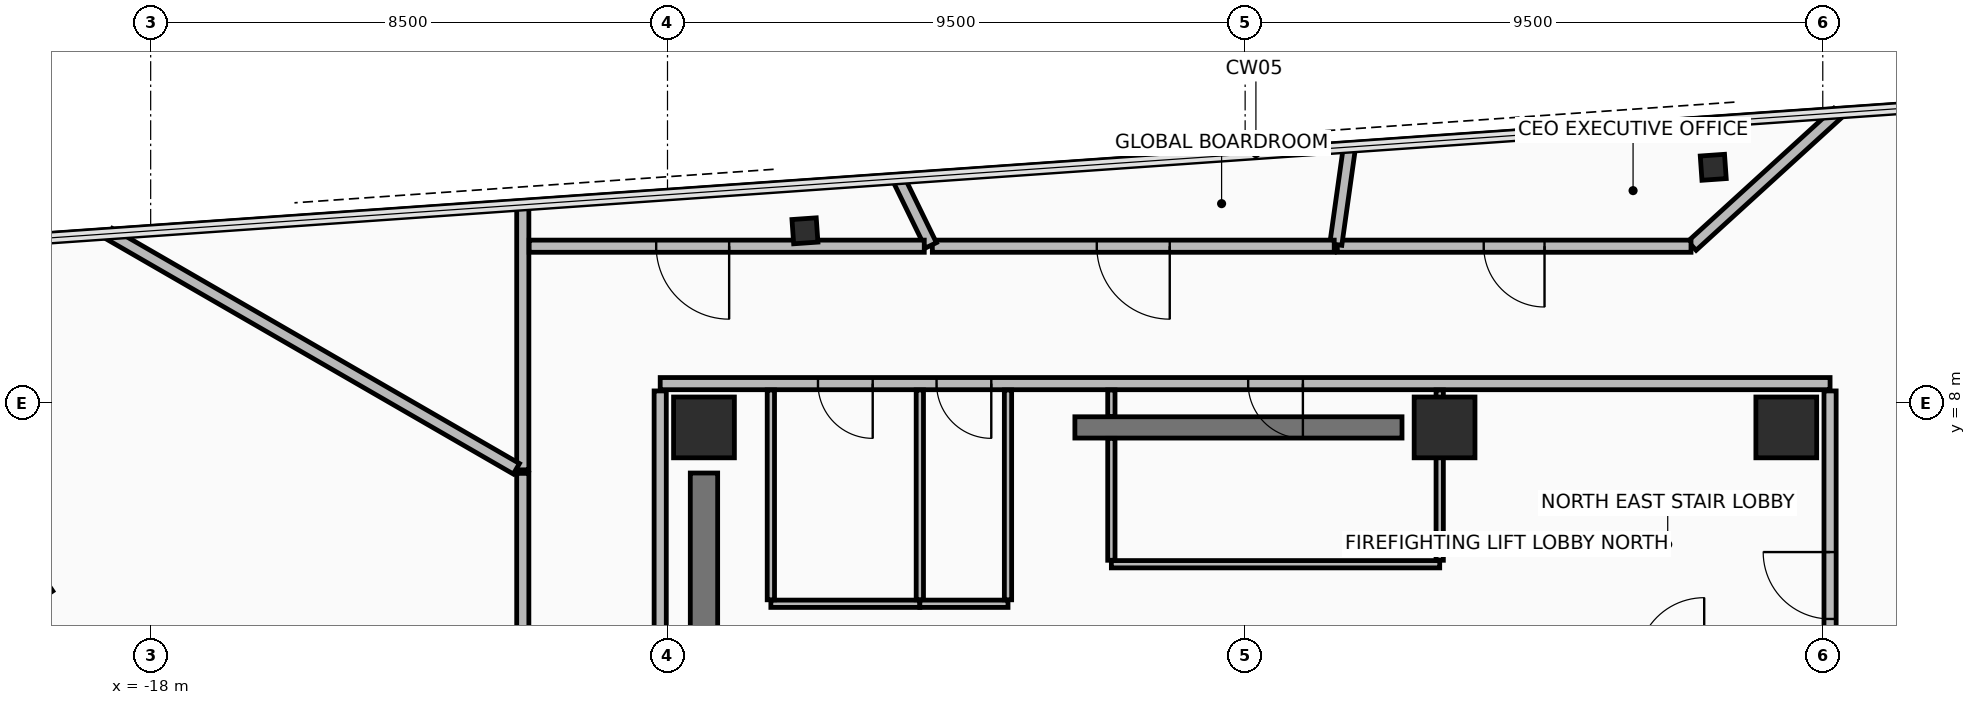
"""IFC4 building model, lengths in metres.
Left out: names, types, materials, properties, quantities, classifications, styles, units other than length and angle.
Written with IfcOpenShell. Run it as: python <this file> out.ifc"""

import sys

from ifc_helpers import new_model, si_unit, direction, frame, frame_2d, origin, origin_2d, place, context, subcontext, project, spatial, rectangle, hollow_rectangle, extrude, element, fill, save


model = new_model("IFC4")
c1 = context("Model", 3, precision=1e-05, world=origin(), true_north=direction((0.0, 1.0)))
c2 = subcontext(c1, "Body", "Model", "MODEL_VIEW")
j1 = project(units=[si_unit("LENGTHUNIT", "METRE"), si_unit("PLANEANGLEUNIT", "RADIAN")], contexts=[c1])
p1 = place(None, origin())
s1 = spatial("IfcSite", under=j1, at=p1, CompositionType="ELEMENT")
p2 = place(p1, origin())
s2 = spatial("IfcBuilding", under=s1, at=p2, CompositionType="ELEMENT")
p3 = place(p2, frame((0.0, 0.0, 253.4)))
s3 = spatial("IfcBuildingStorey", under=s2, at=p3, CompositionType="ELEMENT", Elevation=253.4)
for number, where, z_axis, x_axis in (
    (1, (8.9, 7.6, 0.0), (0.0, 0.0, 1.0), (1.0, 0.0, 0.0)),
    (2, (3.28, 7.6, 0.0), (0.0, 0.0, 1.0), (1.0, 0.0, 0.0)),
    (3, (-8.9, 7.6, 0.0), (0.0, 0.0, 1.0), (1.0, 0.0, 0.0)),
):
    element("IfcColumn", number, at=place(p3, frame(where, z_axis=z_axis, x_axis=x_axis)), inside=s3, PredefinedType="COLUMN", context=c2, shape_type="SweptSolid", body=[
        extrude(rectangle(XDim=1.0, YDim=1.0, at=origin_2d()), origin(), (0.0, 0.0, 1.0), 3.6),
    ])
p4 = place(p3, frame((7.699, 11.878, -0.19), z_axis=(0.0, 0.0, 1.0), x_axis=(0.99756392851, 0.069758214822, 0.0)))
e4 = element("IfcColumn", 4, at=p4, inside=s3, PredefinedType="COLUMN", context=c2, shape_type="SweptSolid", body=[
    extrude(hollow_rectangle(XDim=0.4, YDim=0.4, WallThickness=0.025, at=origin_2d()), origin(), (0.0, 0.0, 1.0), 3.79),
])
p5 = place(p3, frame((-7.24, 10.833, 0.0), z_axis=(0.0, 0.0, 1.0), x_axis=(0.99756392851, 0.069758214822, 0.0)))
e5 = element("IfcColumn", 5, at=p5, inside=s3, PredefinedType="COLUMN", context=c2, shape_type="SweptSolid", body=[
    extrude(hollow_rectangle(XDim=0.4, YDim=0.4, WallThickness=0.025, at=origin_2d()), origin(), (0.0, 0.0, 1.0), 3.6),
])
p6 = place(p3, frame((-23.526, 10.446, 0.0), z_axis=(0.0, 0.0, 1.0), x_axis=(0.559187716425, -0.829041071238, 0.0)))
e6 = element("IfcWall", 6, at=p6, inside=s3, PredefinedType="STANDARD", context=c2, shape_type="SweptSolid", body=[
    extrude(rectangle(XDim=6.78, YDim=0.3, at=frame_2d((3.39, 0.0))), origin(), (0.0, 0.0, 1.0), 2.765),
])
p7 = place(p6, frame((3.186, 0.0, 0.0)))
e7 = element("IfcOpeningElement", 7, at=p7, cuts=e6, PredefinedType="OPENING", context=c2, shape_type="SweptSolid", body=[
    extrude(rectangle(XDim=1.1, YDim=2.2, at=frame_2d((0.55, 1.1))), frame((0.0, 0.16, 0.0), z_axis=(0.0, -1.0, 0.0), x_axis=(1.0, 0.0, 0.0)), (0.0, 0.0, 1.0), 0.32),
])
p8 = place(p3, frame((-2.8, 7.6, 0.0), z_axis=(0.0, 0.0, 1.0), x_axis=(1.0, 0.0, 0.0)))
e8 = element("IfcWall", 8, at=p8, inside=s3, PredefinedType="SHEAR", context=c2, shape_type="SweptSolid", body=[
    extrude(rectangle(XDim=5.38, YDim=0.35, at=frame_2d((2.69, 0.0))), origin(), (0.0, 0.0, 1.0), 3.42),
])
p9 = place(p3, frame((-8.9, -3.85, 0.0), z_axis=(0.0, 0.0, 1.0), x_axis=(0.0, 1.0, 0.0)))
e9 = element("IfcWall", 9, at=p9, inside=s3, PredefinedType="SHEAR", context=c2, shape_type="SweptSolid", body=[
    extrude(rectangle(XDim=10.7, YDim=0.45, at=frame_2d((5.35, 0.0))), origin(), (0.0, 0.0, 1.0), 3.42),
])
p10 = place(p3, frame((9.62, 8.32, 0.0), z_axis=(0.0, 0.0, 1.0), x_axis=(-1.0, 0.0, 0.0)))
e10 = element("IfcWall", 10, at=p10, inside=s3, PredefinedType="PARTITIONING", context=c2, shape_type="SweptSolid", body=[
    extrude(rectangle(XDim=19.24, YDim=0.2, at=frame_2d((9.62, 0.0))), origin(), (0.0, 0.0, 1.0), 2.915),
])
p11 = place(p10, frame((8.67, 0.0, 0.0)))
e11 = element("IfcOpeningElement", 11, at=p11, cuts=e10, PredefinedType="OPENING", context=c2, shape_type="SweptSolid", body=[
    extrude(rectangle(XDim=0.9, YDim=2.1, at=frame_2d((0.45, 1.05))), frame((0.0, 0.11, 0.0), z_axis=(0.0, -1.0, 0.0), x_axis=(1.0, 0.0, 0.0)), (0.0, 0.0, 1.0), 0.22),
])
p12 = place(p10, frame((15.745, 0.0, 0.0)))
e12 = element("IfcOpeningElement", 12, at=p12, cuts=e10, PredefinedType="OPENING", context=c2, shape_type="SweptSolid", body=[
    extrude(rectangle(XDim=0.9, YDim=2.1, at=frame_2d((0.45, 1.05))), frame((0.0, 0.11, 0.0), z_axis=(0.0, -1.0, 0.0), x_axis=(1.0, 0.0, 0.0)), (0.0, 0.0, 1.0), 0.22),
])
p13 = place(p10, frame((13.795, 0.0, 0.0)))
e13 = element("IfcOpeningElement", 13, at=p13, cuts=e10, PredefinedType="OPENING", context=c2, shape_type="SweptSolid", body=[
    extrude(rectangle(XDim=0.9, YDim=2.1, at=frame_2d((0.45, 1.05))), frame((0.0, 0.11, 0.0), z_axis=(0.0, -1.0, 0.0), x_axis=(1.0, 0.0, 0.0)), (0.0, 0.0, 1.0), 0.22),
])
p14 = place(p3, frame((-9.62, 8.2, 0.0), z_axis=(0.0, 0.0, 1.0), x_axis=(0.0, -1.0, 0.0)))
e14 = element("IfcWall", 14, at=p14, inside=s3, PredefinedType="PARTITIONING", context=c2, shape_type="SweptSolid", body=[
    extrude(rectangle(XDim=16.4, YDim=0.2, at=frame_2d((8.2, 0.0))), origin(), (0.0, 0.0, 1.0), 2.765),
])
p15 = place(p14, frame((12.65, 0.0, 0.0)))
e15 = element("IfcOpeningElement", 15, at=p15, cuts=e14, PredefinedType="OPENING", context=c2, shape_type="SweptSolid", body=[
    extrude(rectangle(XDim=1.1, YDim=2.15, at=frame_2d((0.55, 1.075))), frame((0.0, 0.11, 0.0), z_axis=(0.0, -1.0, 0.0), x_axis=(1.0, 0.0, 0.0)), (0.0, 0.0, 1.0), 0.22),
])
p16 = place(p3, frame((9.62, -8.2, 0.0), z_axis=(0.0, 0.0, 1.0), x_axis=(0.0, 1.0, 0.0)))
e16 = element("IfcWall", 16, at=p16, inside=s3, PredefinedType="PARTITIONING", context=c2, shape_type="SweptSolid", body=[
    extrude(rectangle(XDim=16.4, YDim=0.2, at=frame_2d((8.2, 0.0))), origin(), (0.0, 0.0, 1.0), 2.915),
])
p17 = place(p16, frame((12.65, 0.0, 0.0)))
e17 = element("IfcOpeningElement", 17, at=p17, cuts=e16, PredefinedType="OPENING", context=c2, shape_type="SweptSolid", body=[
    extrude(rectangle(XDim=1.1, YDim=2.15, at=frame_2d((0.55, 1.075))), frame((0.0, 0.11, 0.0), z_axis=(0.0, -1.0, 0.0), x_axis=(1.0, 0.0, 0.0)), (0.0, 0.0, 1.0), 0.22),
])
p18 = place(p3, frame((-2.2, 5.35, 0.0), z_axis=(0.0, 0.0, 1.0), x_axis=(1.0, 0.0, 0.0)))
e18 = element("IfcWall", 18, at=p18, inside=s3, PredefinedType="PARTITIONING", context=c2, shape_type="SweptSolid", body=[
    extrude(rectangle(XDim=5.4, YDim=0.12, at=frame_2d((2.7, 0.0))), origin(), (0.0, 0.0, 1.0), 2.715),
])
p19 = place(p3, frame((3.2, 5.415, 0.0), z_axis=(0.0, 0.0, 1.0), x_axis=(0.0, 1.0, 0.0)))
e19 = element("IfcWall", 19, at=p19, inside=s3, PredefinedType="PARTITIONING", context=c2, shape_type="SweptSolid", body=[
    extrude(rectangle(XDim=2.8, YDim=0.12, at=frame_2d((1.4, 0.0))), origin(), (0.0, 0.0, 1.0), 2.715),
])
p20 = place(p3, frame((-2.2, 8.215, 0.0), z_axis=(0.0, 0.0, 1.0), x_axis=(0.0, -1.0, 0.0)))
e20 = element("IfcWall", 20, at=p20, inside=s3, PredefinedType="PARTITIONING", context=c2, shape_type="SweptSolid", body=[
    extrude(rectangle(XDim=0.435, YDim=0.12, at=frame_2d((0.218, 0.0))), origin(), (0.0, 0.0, 1.0), 2.715),
])
p21 = place(p3, frame((-2.2, 7.42, 0.0), z_axis=(0.0, 0.0, 1.0), x_axis=(0.0, -1.0, 0.0)))
e21 = element("IfcWall", 21, at=p21, inside=s3, PredefinedType="PARTITIONING", context=c2, shape_type="SweptSolid", body=[
    extrude(rectangle(XDim=2.005, YDim=0.12, at=frame_2d((1.002, 0.0))), origin(), (0.0, 0.0, 1.0), 2.715),
])
p22 = place(p3, frame((-7.8, 4.7, 0.0), z_axis=(0.0, 0.0, 1.0), x_axis=(1.0, 0.0, 0.0)))
e22 = element("IfcWall", 22, at=p22, inside=s3, PredefinedType="PARTITIONING", context=c2, shape_type="SweptSolid", body=[
    extrude(rectangle(XDim=2.45, YDim=0.12, at=frame_2d((1.225, 0.0))), origin(), (0.0, 0.0, 1.0), 3.42),
])
for number, where, z_axis, x_axis in (
    (23, (-5.35, 4.765, 0.0), (0.0, 0.0, 1.0), (0.0, 1.0, 0.0)),
    (24, (-7.8, 8.215, 0.0), (0.0, 0.0, 1.0), (0.0, -1.0, 0.0)),
):
    element("IfcWall", number, at=place(p3, frame(where, z_axis=z_axis, x_axis=x_axis)), inside=s3, PredefinedType="PARTITIONING", context=c2, shape_type="SweptSolid", body=[
        extrude(rectangle(XDim=3.45, YDim=0.12, at=frame_2d((1.725, 0.0))), origin(), (0.0, 0.0, 1.0), 2.715),
    ])
p23 = place(p3, frame((-5.35, 4.7, 0.0), z_axis=(0.0, 0.0, 1.0), x_axis=(1.0, 0.0, 0.0)))
e25 = element("IfcWall", 25, at=p23, inside=s3, PredefinedType="PARTITIONING", context=c2, shape_type="SweptSolid", body=[
    extrude(rectangle(XDim=1.45, YDim=0.12, at=frame_2d((0.725, 0.0))), origin(), (0.0, 0.0, 1.0), 3.42),
])
p24 = place(p3, frame((-3.9, 4.765, 0.0), z_axis=(0.0, 0.0, 1.0), x_axis=(0.0, 1.0, 0.0)))
e26 = element("IfcWall", 26, at=p24, inside=s3, PredefinedType="PARTITIONING", context=c2, shape_type="SweptSolid", body=[
    extrude(rectangle(XDim=3.45, YDim=0.12, at=frame_2d((1.725, 0.0))), origin(), (0.0, 0.0, 1.0), 2.715),
])
p25 = place(p3, frame((9.749, 12.773, 0.0), z_axis=(0.0, 0.0, 1.0), x_axis=(-0.739034043314, -0.673668080603, 0.0)))
e27 = element("IfcWall", 27, at=p25, inside=s3, PredefinedType="PARTITIONING", context=c2, shape_type="SweptSolid", body=[
    extrude(rectangle(XDim=3.246, YDim=0.2, at=frame_2d((1.623, 0.0))), origin(), (0.0, 0.0, 1.0), 2.765),
])
p26 = place(p3, frame((7.333, 10.58, 0.0), z_axis=(0.0, 0.0, 1.0), x_axis=(-1.0, 0.0, 0.0)))
e28 = element("IfcWall", 28, at=p26, inside=s3, PredefinedType="PARTITIONING", context=c2, shape_type="SweptSolid", body=[
    extrude(rectangle(XDim=5.817, YDim=0.2, at=frame_2d((2.909, 0.0))), origin(), (0.0, 0.0, 1.0), 3.42),
])
p27 = place(p26, frame((2.409, 0.0, 0.0)))
e29 = element("IfcOpeningElement", 29, at=p27, cuts=e28, PredefinedType="OPENING", context=c2, shape_type="SweptSolid", body=[
    extrude(rectangle(XDim=1.0, YDim=2.15, at=frame_2d((0.5, 1.075))), frame((0.0, 0.11, 0.0), z_axis=(0.0, -1.0, 0.0), x_axis=(1.0, 0.0, 0.0)), (0.0, 0.0, 1.0), 0.22),
])
p28 = place(p3, frame((1.491, 10.608, 0.0), z_axis=(0.0, 0.0, 1.0), x_axis=(0.139154192709, 0.990270725939, 0.0)))
e30 = element("IfcWall", 30, at=p28, inside=s3, PredefinedType="PARTITIONING", context=c2, shape_type="SweptSolid", body=[
    extrude(rectangle(XDim=1.598, YDim=0.2, at=frame_2d((0.799, 0.0))), origin(), (0.0, 0.0, 1.0), 2.765),
])
p29 = place(p3, frame((1.465, 10.58, 0.0), z_axis=(0.0, 0.0, 1.0), x_axis=(-1.0, 0.0, 0.0)))
e31 = element("IfcWall", 31, at=p29, inside=s3, PredefinedType="PARTITIONING", context=c2, shape_type="SweptSolid", body=[
    extrude(rectangle(XDim=6.61, YDim=0.2, at=frame_2d((3.305, 0.0))), origin(), (0.0, 0.0, 1.0), 3.42),
])
p30 = place(p29, frame((2.705, 0.0, 0.0)))
e32 = element("IfcOpeningElement", 32, at=p30, cuts=e31, PredefinedType="OPENING", context=c2, shape_type="SweptSolid", body=[
    extrude(rectangle(XDim=1.2, YDim=2.15, at=frame_2d((0.6, 1.075))), frame((0.0, 0.11, 0.0), z_axis=(0.0, -1.0, 0.0), x_axis=(1.0, 0.0, 0.0)), (0.0, 0.0, 1.0), 0.22),
])
p31 = place(p3, frame((-5.167, 10.594, 0.0), z_axis=(0.0, 0.0, 1.0), x_axis=(-0.438482667622, 0.89873964539, 0.0)))
e33 = element("IfcWall", 33, at=p31, inside=s3, PredefinedType="PARTITIONING", context=c2, shape_type="SweptSolid", body=[
    extrude(rectangle(XDim=1.222, YDim=0.2, at=frame_2d((0.611, 0.0))), origin(), (0.0, 0.0, 1.0), 2.765),
])
p32 = place(p3, frame((-11.88, 11.26, 0.0), z_axis=(0.0, 0.0, 1.0), x_axis=(0.0, -1.0, 0.0)))
e34 = element("IfcWall", 34, at=p32, inside=s3, PredefinedType="PARTITIONING", context=c2, shape_type="SweptSolid", body=[
    extrude(rectangle(XDim=4.358, YDim=0.2, at=frame_2d((2.179, 0.0))), origin(), (0.0, 0.0, 1.0), 2.765),
])
p33 = place(p3, frame((-11.985, 6.92, 0.0), z_axis=(0.0, 0.0, 1.0), x_axis=(-0.866026758741, 0.499997653139, 0.0)))
e35 = element("IfcWall", 35, at=p33, inside=s3, PredefinedType="PARTITIONING", context=c2, shape_type="SweptSolid", body=[
    extrude(rectangle(XDim=7.73, YDim=0.2, at=frame_2d((3.865, 0.0))), origin(), (0.0, 0.0, 1.0), 2.765),
])
p34 = place(p3, frame((-5.277, 10.58, 0.0), z_axis=(0.0, 0.0, 1.0), x_axis=(-1.0, 0.0, 0.0)))
e36 = element("IfcWall", 36, at=p34, inside=s3, PredefinedType="PARTITIONING", context=c2, shape_type="SweptSolid", body=[
    extrude(rectangle(XDim=6.498, YDim=0.2, at=frame_2d((3.249, 0.0))), origin(), (0.0, 0.0, 1.0), 2.765),
])
p35 = place(p34, frame((3.209, 0.0, 0.0)))
e37 = element("IfcOpeningElement", 37, at=p35, cuts=e36, PredefinedType="OPENING", context=c2, shape_type="SweptSolid", body=[
    extrude(rectangle(XDim=1.2, YDim=2.15, at=frame_2d((0.6, 1.075))), frame((0.0, 0.11, 0.0), z_axis=(0.0, -1.0, 0.0), x_axis=(1.0, 0.0, 0.0)), (0.0, 0.0, 1.0), 0.22),
])
p36 = place(p3, frame((-11.88, 6.844, 0.0), z_axis=(0.0, 0.0, 1.0), x_axis=(0.0, -1.0, 0.0)))
e38 = element("IfcWall", 38, at=p36, inside=s3, PredefinedType="PARTITIONING", context=c2, shape_type="SweptSolid", body=[
    extrude(rectangle(XDim=8.071, YDim=0.2, at=frame_2d((4.035, 0.0))), origin(), (0.0, 0.0, 1.0), 2.915),
])
p37 = place(p36, frame((3.535, 0.0, 0.0)))
e39 = element("IfcOpeningElement", 39, at=p37, cuts=e38, PredefinedType="OPENING", context=c2, shape_type="SweptSolid", body=[
    extrude(rectangle(XDim=1.0, YDim=2.15, at=frame_2d((0.5, 1.075))), frame((0.0, 0.11, 0.0), z_axis=(0.0, -1.0, 0.0), x_axis=(1.0, 0.0, 0.0)), (0.0, 0.0, 1.0), 0.22),
])
p38 = place(p17, frame((1.1, 0.0, 0.0), z_axis=(0.0, 0.0, 1.0), x_axis=(-1.0, 0.0, 0.0)))
e40 = element("IfcDoor", 40, at=p38, inside=s3, OperationType="SINGLE_SWING_LEFT", PredefinedType="DOOR", context=c2, shape_type="SweptSolid", body=[
    extrude(rectangle(XDim=1.1, YDim=2.15, at=frame_2d((0.55, 1.075))), frame((0.0, 0.025, 0.0), z_axis=(0.0, -1.0, 0.0), x_axis=(1.0, 0.0, 0.0)), (0.0, 0.0, 1.0), 0.05),
])
fill(e17, e40)
p39 = place(p11, origin())
e41 = element("IfcDoor", 41, at=p39, inside=s3, OperationType="SINGLE_SWING_LEFT", PredefinedType="DOOR", context=c2, shape_type="SweptSolid", body=[
    extrude(rectangle(XDim=0.9, YDim=2.1, at=frame_2d((0.45, 1.05))), frame((0.0, 0.025, 0.0), z_axis=(0.0, -1.0, 0.0), x_axis=(1.0, 0.0, 0.0)), (0.0, 0.0, 1.0), 0.05),
])
fill(e11, e41)
p40 = place(p12, origin())
e42 = element("IfcDoor", 42, at=p40, inside=s3, OperationType="SINGLE_SWING_LEFT", PredefinedType="DOOR", context=c2, shape_type="SweptSolid", body=[
    extrude(rectangle(XDim=0.9, YDim=2.1, at=frame_2d((0.45, 1.05))), frame((0.0, 0.025, 0.0), z_axis=(0.0, -1.0, 0.0), x_axis=(1.0, 0.0, 0.0)), (0.0, 0.0, 1.0), 0.05),
])
fill(e12, e42)
p41 = place(p13, origin())
e43 = element("IfcDoor", 43, at=p41, inside=s3, OperationType="SINGLE_SWING_LEFT", PredefinedType="DOOR", context=c2, shape_type="SweptSolid", body=[
    extrude(rectangle(XDim=0.9, YDim=2.1, at=frame_2d((0.45, 1.05))), frame((0.0, 0.025, 0.0), z_axis=(0.0, -1.0, 0.0), x_axis=(1.0, 0.0, 0.0)), (0.0, 0.0, 1.0), 0.05),
])
fill(e13, e43)
p42 = place(p27, origin())
e44 = element("IfcDoor", 44, at=p42, inside=s3, OperationType="SINGLE_SWING_RIGHT", PredefinedType="DOOR", context=c2, shape_type="SweptSolid", body=[
    extrude(rectangle(XDim=1.0, YDim=2.15, at=frame_2d((0.5, 1.075))), frame((0.0, 0.025, 0.0), z_axis=(0.0, -1.0, 0.0), x_axis=(1.0, 0.0, 0.0)), (0.0, 0.0, 1.0), 0.05),
])
fill(e29, e44)
p43 = place(p30, origin())
e45 = element("IfcDoor", 45, at=p43, inside=s3, OperationType="SINGLE_SWING_LEFT", PredefinedType="DOOR", context=c2, shape_type="SweptSolid", body=[
    extrude(rectangle(XDim=1.2, YDim=2.15, at=frame_2d((0.6, 1.075))), frame((0.0, 0.025, 0.0), z_axis=(0.0, -1.0, 0.0), x_axis=(1.0, 0.0, 0.0)), (0.0, 0.0, 1.0), 0.05),
])
fill(e32, e45)
p44 = place(p35, origin())
e46 = element("IfcDoor", 46, at=p44, inside=s3, OperationType="SINGLE_SWING_LEFT", PredefinedType="DOOR", context=c2, shape_type="SweptSolid", body=[
    extrude(rectangle(XDim=1.2, YDim=2.15, at=frame_2d((0.6, 1.075))), frame((0.0, 0.025, 0.0), z_axis=(0.0, -1.0, 0.0), x_axis=(1.0, 0.0, 0.0)), (0.0, 0.0, 1.0), 0.05),
])
fill(e37, e46)
save(model, sys.argv[1])
